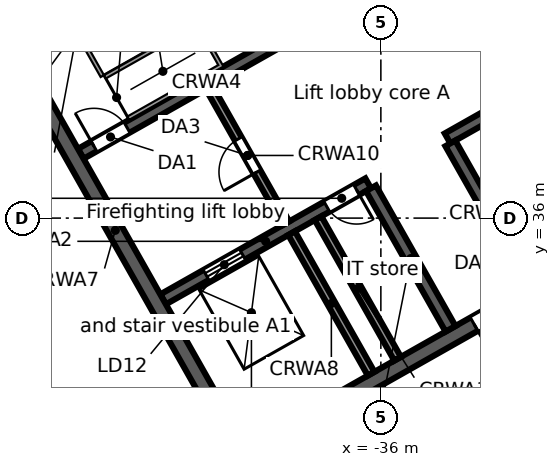
"""IFC4 building model, lengths in metres.
Left out: names, types, materials, properties, quantities, classifications, styles, units other than length and angle.
Written with IfcOpenShell. Run it as: python <this file> out.ifc"""

import sys

from ifc_helpers import new_model, si_unit, direction, frame, frame_2d, origin, place, context, subcontext, project, spatial, rectangle, extrude, element, fill, save


model = new_model("IFC4")
c1 = context("Model", 3, precision=1e-05, world=origin(), true_north=direction((0.0, 1.0)))
c2 = subcontext(c1, "Body", "Model", "MODEL_VIEW")
j1 = project(units=[si_unit("LENGTHUNIT", "METRE"), si_unit("PLANEANGLEUNIT", "RADIAN")], contexts=[c1])
p1 = place(None, origin())
s1 = spatial("IfcSite", under=j1, at=p1, CompositionType="ELEMENT")
p2 = place(p1, origin())
s2 = spatial("IfcBuilding", under=s1, at=p2, CompositionType="ELEMENT")
p3 = place(p2, frame((0.0, 0.0, 274.1)))
s3 = spatial("IfcBuildingStorey", under=s2, at=p3, CompositionType="ELEMENT", Elevation=274.1)
p4 = place(p3, frame((-58.732, 38.771, 0.0), z_axis=(0.0, 0.0, 1.0), x_axis=(0.870355615581, 0.492423702137, 0.0)))
e1 = element("IfcWall", 1, at=p4, inside=s3, PredefinedType="STANDARD", context=c2, shape_type="SweptSolid", body=[
    extrude(rectangle(XDim=64.052, YDim=0.25, at=frame_2d((32.026, 0.0))), origin(), (0.0, 0.0, 1.0), 3.52),
])
p5 = place(p4, frame((61.259, 0.0, 0.8)))
e2 = element("IfcOpeningElement", 2, at=p5, cuts=e1, PredefinedType="OPENING", context=c2, shape_type="SweptSolid", body=[
    extrude(rectangle(XDim=2.4, YDim=2.2, at=frame_2d((1.2, 1.1))), frame((0.0, 0.135, 0.0), z_axis=(0.0, -1.0, 0.0), x_axis=(1.0, 0.0, 0.0)), (0.0, 0.0, 1.0), 0.27),
])
p6 = place(p4, frame((58.216, 0.0, 0.8)))
e3 = element("IfcOpeningElement", 3, at=p6, cuts=e1, PredefinedType="OPENING", context=c2, shape_type="SweptSolid", body=[
    extrude(rectangle(XDim=2.4, YDim=2.2, at=frame_2d((1.2, 1.1))), frame((0.0, 0.135, 0.0), z_axis=(0.0, -1.0, 0.0), x_axis=(1.0, 0.0, 0.0)), (0.0, 0.0, 1.0), 0.27),
])
p7 = place(p4, frame((55.173, 0.0, 0.8)))
e4 = element("IfcOpeningElement", 4, at=p7, cuts=e1, PredefinedType="OPENING", context=c2, shape_type="SweptSolid", body=[
    extrude(rectangle(XDim=2.4, YDim=2.2, at=frame_2d((1.2, 1.1))), frame((0.0, 0.135, 0.0), z_axis=(0.0, -1.0, 0.0), x_axis=(1.0, 0.0, 0.0)), (0.0, 0.0, 1.0), 0.27),
])
p8 = place(p4, frame((52.129, 0.0, 0.8)))
e5 = element("IfcOpeningElement", 5, at=p8, cuts=e1, PredefinedType="OPENING", context=c2, shape_type="SweptSolid", body=[
    extrude(rectangle(XDim=2.4, YDim=2.2, at=frame_2d((1.2, 1.1))), frame((0.0, 0.135, 0.0), z_axis=(0.0, -1.0, 0.0), x_axis=(1.0, 0.0, 0.0)), (0.0, 0.0, 1.0), 0.27),
])
p9 = place(p4, frame((49.086, 0.0, 0.8)))
e6 = element("IfcOpeningElement", 6, at=p9, cuts=e1, PredefinedType="OPENING", context=c2, shape_type="SweptSolid", body=[
    extrude(rectangle(XDim=2.4, YDim=2.2, at=frame_2d((1.2, 1.1))), frame((0.0, 0.135, 0.0), z_axis=(0.0, -1.0, 0.0), x_axis=(1.0, 0.0, 0.0)), (0.0, 0.0, 1.0), 0.27),
])
p10 = place(p4, frame((46.043, 0.0, 0.8)))
e7 = element("IfcOpeningElement", 7, at=p10, cuts=e1, PredefinedType="OPENING", context=c2, shape_type="SweptSolid", body=[
    extrude(rectangle(XDim=2.4, YDim=2.2, at=frame_2d((1.2, 1.1))), frame((0.0, 0.135, 0.0), z_axis=(0.0, -1.0, 0.0), x_axis=(1.0, 0.0, 0.0)), (0.0, 0.0, 1.0), 0.27),
])
p11 = place(p4, frame((43.0, 0.0, 0.8)))
e8 = element("IfcOpeningElement", 8, at=p11, cuts=e1, PredefinedType="OPENING", context=c2, shape_type="SweptSolid", body=[
    extrude(rectangle(XDim=2.4, YDim=2.2, at=frame_2d((1.2, 1.1))), frame((0.0, 0.135, 0.0), z_axis=(0.0, -1.0, 0.0), x_axis=(1.0, 0.0, 0.0)), (0.0, 0.0, 1.0), 0.27),
])
p12 = place(p4, frame((39.956, 0.0, 0.8)))
e9 = element("IfcOpeningElement", 9, at=p12, cuts=e1, PredefinedType="OPENING", context=c2, shape_type="SweptSolid", body=[
    extrude(rectangle(XDim=2.4, YDim=2.2, at=frame_2d((1.2, 1.1))), frame((0.0, 0.135, 0.0), z_axis=(0.0, -1.0, 0.0), x_axis=(1.0, 0.0, 0.0)), (0.0, 0.0, 1.0), 0.27),
])
p13 = place(p4, frame((36.913, 0.0, 0.8)))
e10 = element("IfcOpeningElement", 10, at=p13, cuts=e1, PredefinedType="OPENING", context=c2, shape_type="SweptSolid", body=[
    extrude(rectangle(XDim=2.4, YDim=2.2, at=frame_2d((1.2, 1.1))), frame((0.0, 0.135, 0.0), z_axis=(0.0, -1.0, 0.0), x_axis=(1.0, 0.0, 0.0)), (0.0, 0.0, 1.0), 0.27),
])
p14 = place(p4, frame((33.87, 0.0, 0.8)))
e11 = element("IfcOpeningElement", 11, at=p14, cuts=e1, PredefinedType="OPENING", context=c2, shape_type="SweptSolid", body=[
    extrude(rectangle(XDim=2.4, YDim=2.2, at=frame_2d((1.2, 1.1))), frame((0.0, 0.135, 0.0), z_axis=(0.0, -1.0, 0.0), x_axis=(1.0, 0.0, 0.0)), (0.0, 0.0, 1.0), 0.27),
])
p15 = place(p4, frame((30.826, 0.0, 0.8)))
e12 = element("IfcOpeningElement", 12, at=p15, cuts=e1, PredefinedType="OPENING", context=c2, shape_type="SweptSolid", body=[
    extrude(rectangle(XDim=2.4, YDim=2.2, at=frame_2d((1.2, 1.1))), frame((0.0, 0.135, 0.0), z_axis=(0.0, -1.0, 0.0), x_axis=(1.0, 0.0, 0.0)), (0.0, 0.0, 1.0), 0.27),
])
p16 = place(p4, frame((27.783, 0.0, 0.8)))
e13 = element("IfcOpeningElement", 13, at=p16, cuts=e1, PredefinedType="OPENING", context=c2, shape_type="SweptSolid", body=[
    extrude(rectangle(XDim=2.4, YDim=2.2, at=frame_2d((1.2, 1.1))), frame((0.0, 0.135, 0.0), z_axis=(0.0, -1.0, 0.0), x_axis=(1.0, 0.0, 0.0)), (0.0, 0.0, 1.0), 0.27),
])
p17 = place(p4, frame((24.74, 0.0, 0.8)))
e14 = element("IfcOpeningElement", 14, at=p17, cuts=e1, PredefinedType="OPENING", context=c2, shape_type="SweptSolid", body=[
    extrude(rectangle(XDim=2.4, YDim=2.2, at=frame_2d((1.2, 1.1))), frame((0.0, 0.135, 0.0), z_axis=(0.0, -1.0, 0.0), x_axis=(1.0, 0.0, 0.0)), (0.0, 0.0, 1.0), 0.27),
])
p18 = place(p4, frame((21.696, 0.0, 0.8)))
e15 = element("IfcOpeningElement", 15, at=p18, cuts=e1, PredefinedType="OPENING", context=c2, shape_type="SweptSolid", body=[
    extrude(rectangle(XDim=2.4, YDim=2.2, at=frame_2d((1.2, 1.1))), frame((0.0, 0.135, 0.0), z_axis=(0.0, -1.0, 0.0), x_axis=(1.0, 0.0, 0.0)), (0.0, 0.0, 1.0), 0.27),
])
p19 = place(p4, frame((18.653, 0.0, 0.8)))
e16 = element("IfcOpeningElement", 16, at=p19, cuts=e1, PredefinedType="OPENING", context=c2, shape_type="SweptSolid", body=[
    extrude(rectangle(XDim=2.4, YDim=2.2, at=frame_2d((1.2, 1.1))), frame((0.0, 0.135, 0.0), z_axis=(0.0, -1.0, 0.0), x_axis=(1.0, 0.0, 0.0)), (0.0, 0.0, 1.0), 0.27),
])
p20 = place(p4, frame((15.61, 0.0, 0.8)))
e17 = element("IfcOpeningElement", 17, at=p20, cuts=e1, PredefinedType="OPENING", context=c2, shape_type="SweptSolid", body=[
    extrude(rectangle(XDim=2.4, YDim=2.2, at=frame_2d((1.2, 1.1))), frame((0.0, 0.135, 0.0), z_axis=(0.0, -1.0, 0.0), x_axis=(1.0, 0.0, 0.0)), (0.0, 0.0, 1.0), 0.27),
])
p21 = place(p4, frame((12.567, 0.0, 0.8)))
e18 = element("IfcOpeningElement", 18, at=p21, cuts=e1, PredefinedType="OPENING", context=c2, shape_type="SweptSolid", body=[
    extrude(rectangle(XDim=2.4, YDim=2.2, at=frame_2d((1.2, 1.1))), frame((0.0, 0.135, 0.0), z_axis=(0.0, -1.0, 0.0), x_axis=(1.0, 0.0, 0.0)), (0.0, 0.0, 1.0), 0.27),
])
p22 = place(p4, frame((9.523, 0.0, 0.8)))
e19 = element("IfcOpeningElement", 19, at=p22, cuts=e1, PredefinedType="OPENING", context=c2, shape_type="SweptSolid", body=[
    extrude(rectangle(XDim=2.4, YDim=2.2, at=frame_2d((1.2, 1.1))), frame((0.0, 0.135, 0.0), z_axis=(0.0, -1.0, 0.0), x_axis=(1.0, 0.0, 0.0)), (0.0, 0.0, 1.0), 0.27),
])
p23 = place(p4, frame((6.48, 0.0, 0.8)))
e20 = element("IfcOpeningElement", 20, at=p23, cuts=e1, PredefinedType="OPENING", context=c2, shape_type="SweptSolid", body=[
    extrude(rectangle(XDim=2.4, YDim=2.2, at=frame_2d((1.2, 1.1))), frame((0.0, 0.135, 0.0), z_axis=(0.0, -1.0, 0.0), x_axis=(1.0, 0.0, 0.0)), (0.0, 0.0, 1.0), 0.27),
])
p24 = place(p4, frame((3.437, 0.0, 0.8)))
e21 = element("IfcOpeningElement", 21, at=p24, cuts=e1, PredefinedType="OPENING", context=c2, shape_type="SweptSolid", body=[
    extrude(rectangle(XDim=2.4, YDim=2.2, at=frame_2d((1.2, 1.1))), frame((0.0, 0.135, 0.0), z_axis=(0.0, -1.0, 0.0), x_axis=(1.0, 0.0, 0.0)), (0.0, 0.0, 1.0), 0.27),
])
p25 = place(p4, frame((0.393, 0.0, 0.8)))
e22 = element("IfcOpeningElement", 22, at=p25, cuts=e1, PredefinedType="OPENING", context=c2, shape_type="SweptSolid", body=[
    extrude(rectangle(XDim=2.4, YDim=2.2, at=frame_2d((1.2, 1.1))), frame((0.0, 0.135, 0.0), z_axis=(0.0, -1.0, 0.0), x_axis=(1.0, 0.0, 0.0)), (0.0, 0.0, 1.0), 0.27),
])
p26 = place(p3, frame((-44.115, 26.507, 0.0), z_axis=(0.0, 0.0, 1.0), x_axis=(-0.857166583633, 0.515039268311, 0.0)))
e23 = element("IfcWall", 23, at=p26, inside=s3, PredefinedType="STANDARD", context=c2, shape_type="SweptSolid", body=[
    extrude(rectangle(XDim=17.106, YDim=0.25, at=frame_2d((8.553, 0.0))), origin(), (0.0, 0.0, 1.0), 3.52),
])
p27 = place(p26, frame((14.417, 0.0, 0.8)))
e24 = element("IfcOpeningElement", 24, at=p27, cuts=e23, PredefinedType="OPENING", context=c2, shape_type="SweptSolid", body=[
    extrude(rectangle(XDim=2.4, YDim=2.2, at=frame_2d((1.2, 1.1))), frame((0.0, 0.135, 0.0), z_axis=(0.0, -1.0, 0.0), x_axis=(1.0, 0.0, 0.0)), (0.0, 0.0, 1.0), 0.27),
])
p28 = place(p26, frame((11.584, 0.0, 0.8)))
e25 = element("IfcOpeningElement", 25, at=p28, cuts=e23, PredefinedType="OPENING", context=c2, shape_type="SweptSolid", body=[
    extrude(rectangle(XDim=2.4, YDim=2.2, at=frame_2d((1.2, 1.1))), frame((0.0, 0.135, 0.0), z_axis=(0.0, -1.0, 0.0), x_axis=(1.0, 0.0, 0.0)), (0.0, 0.0, 1.0), 0.27),
])
p29 = place(p26, frame((8.75, 0.0, 0.8)))
e26 = element("IfcOpeningElement", 26, at=p29, cuts=e23, PredefinedType="OPENING", context=c2, shape_type="SweptSolid", body=[
    extrude(rectangle(XDim=2.4, YDim=2.2, at=frame_2d((1.2, 1.1))), frame((0.0, 0.135, 0.0), z_axis=(0.0, -1.0, 0.0), x_axis=(1.0, 0.0, 0.0)), (0.0, 0.0, 1.0), 0.27),
])
p30 = place(p26, frame((5.917, 0.0, 0.8)))
e27 = element("IfcOpeningElement", 27, at=p30, cuts=e23, PredefinedType="OPENING", context=c2, shape_type="SweptSolid", body=[
    extrude(rectangle(XDim=2.4, YDim=2.2, at=frame_2d((1.2, 1.1))), frame((0.0, 0.135, 0.0), z_axis=(0.0, -1.0, 0.0), x_axis=(1.0, 0.0, 0.0)), (0.0, 0.0, 1.0), 0.27),
])
p31 = place(p26, frame((3.084, 0.0, 0.8)))
e28 = element("IfcOpeningElement", 28, at=p31, cuts=e23, PredefinedType="OPENING", context=c2, shape_type="SweptSolid", body=[
    extrude(rectangle(XDim=2.4, YDim=2.2, at=frame_2d((1.2, 1.1))), frame((0.0, 0.135, 0.0), z_axis=(0.0, -1.0, 0.0), x_axis=(1.0, 0.0, 0.0)), (0.0, 0.0, 1.0), 0.27),
])
p32 = place(p26, frame((0.25, 0.0, 0.8)))
e29 = element("IfcOpeningElement", 29, at=p32, cuts=e23, PredefinedType="OPENING", context=c2, shape_type="SweptSolid", body=[
    extrude(rectangle(XDim=2.4, YDim=2.2, at=frame_2d((1.2, 1.1))), frame((0.0, 0.135, 0.0), z_axis=(0.0, -1.0, 0.0), x_axis=(1.0, 0.0, 0.0)), (0.0, 0.0, 1.0), 0.27),
])
p33 = place(p3, frame((-3.017, 46.293, 0.0), z_axis=(0.0, 0.0, 1.0), x_axis=(-0.870355474887, -0.492423950812, 0.0)))
e30 = element("IfcWall", 30, at=p33, inside=s3, PredefinedType="STANDARD", context=c2, shape_type="SweptSolid", body=[
    extrude(rectangle(XDim=40.34, YDim=0.25, at=frame_2d((20.17, 0.0))), origin(), (0.0, 0.0, 1.0), 3.52),
])
p34 = place(p33, frame((37.428, 0.0, 0.8)))
e31 = element("IfcOpeningElement", 31, at=p34, cuts=e30, PredefinedType="OPENING", context=c2, shape_type="SweptSolid", body=[
    extrude(rectangle(XDim=2.4, YDim=2.2, at=frame_2d((1.2, 1.1))), frame((0.0, 0.135, 0.0), z_axis=(0.0, -1.0, 0.0), x_axis=(1.0, 0.0, 0.0)), (0.0, 0.0, 1.0), 0.27),
])
p35 = place(p33, frame((34.372, 0.0, 0.0)))
e32 = element("IfcOpeningElement", 32, at=p35, cuts=e30, PredefinedType="OPENING", context=c2, shape_type="SweptSolid", body=[
    extrude(rectangle(XDim=1.8, YDim=2.4, at=frame_2d((0.9, 1.2))), frame((0.0, 0.135, 0.0), z_axis=(0.0, -1.0, 0.0), x_axis=(1.0, 0.0, 0.0)), (0.0, 0.0, 1.0), 0.27),
])
p36 = place(p33, frame((30.716, 0.0, 0.8)))
e33 = element("IfcOpeningElement", 33, at=p36, cuts=e30, PredefinedType="OPENING", context=c2, shape_type="SweptSolid", body=[
    extrude(rectangle(XDim=2.4, YDim=2.2, at=frame_2d((1.2, 1.1))), frame((0.0, 0.135, 0.0), z_axis=(0.0, -1.0, 0.0), x_axis=(1.0, 0.0, 0.0)), (0.0, 0.0, 1.0), 0.27),
])
p37 = place(p33, frame((27.36, 0.0, 0.8)))
e34 = element("IfcOpeningElement", 34, at=p37, cuts=e30, PredefinedType="OPENING", context=c2, shape_type="SweptSolid", body=[
    extrude(rectangle(XDim=2.4, YDim=2.2, at=frame_2d((1.2, 1.1))), frame((0.0, 0.135, 0.0), z_axis=(0.0, -1.0, 0.0), x_axis=(1.0, 0.0, 0.0)), (0.0, 0.0, 1.0), 0.27),
])
p38 = place(p33, frame((24.304, 0.0, 0.0)))
e35 = element("IfcOpeningElement", 35, at=p38, cuts=e30, PredefinedType="OPENING", context=c2, shape_type="SweptSolid", body=[
    extrude(rectangle(XDim=1.8, YDim=2.4, at=frame_2d((0.9, 1.2))), frame((0.0, 0.135, 0.0), z_axis=(0.0, -1.0, 0.0), x_axis=(1.0, 0.0, 0.0)), (0.0, 0.0, 1.0), 0.27),
])
p39 = place(p33, frame((20.648, 0.0, 0.8)))
e36 = element("IfcOpeningElement", 36, at=p39, cuts=e30, PredefinedType="OPENING", context=c2, shape_type="SweptSolid", body=[
    extrude(rectangle(XDim=2.4, YDim=2.2, at=frame_2d((1.2, 1.1))), frame((0.0, 0.135, 0.0), z_axis=(0.0, -1.0, 0.0), x_axis=(1.0, 0.0, 0.0)), (0.0, 0.0, 1.0), 0.27),
])
p40 = place(p33, frame((17.292, 0.0, 0.8)))
e37 = element("IfcOpeningElement", 37, at=p40, cuts=e30, PredefinedType="OPENING", context=c2, shape_type="SweptSolid", body=[
    extrude(rectangle(XDim=2.4, YDim=2.2, at=frame_2d((1.2, 1.1))), frame((0.0, 0.135, 0.0), z_axis=(0.0, -1.0, 0.0), x_axis=(1.0, 0.0, 0.0)), (0.0, 0.0, 1.0), 0.27),
])
p41 = place(p33, frame((14.236, 0.0, 0.0)))
e38 = element("IfcOpeningElement", 38, at=p41, cuts=e30, PredefinedType="OPENING", context=c2, shape_type="SweptSolid", body=[
    extrude(rectangle(XDim=1.8, YDim=2.4, at=frame_2d((0.9, 1.2))), frame((0.0, 0.135, 0.0), z_axis=(0.0, -1.0, 0.0), x_axis=(1.0, 0.0, 0.0)), (0.0, 0.0, 1.0), 0.27),
])
p42 = place(p33, frame((10.58, 0.0, 0.8)))
e39 = element("IfcOpeningElement", 39, at=p42, cuts=e30, PredefinedType="OPENING", context=c2, shape_type="SweptSolid", body=[
    extrude(rectangle(XDim=2.4, YDim=2.2, at=frame_2d((1.2, 1.1))), frame((0.0, 0.135, 0.0), z_axis=(0.0, -1.0, 0.0), x_axis=(1.0, 0.0, 0.0)), (0.0, 0.0, 1.0), 0.27),
])
p43 = place(p33, frame((7.224, 0.0, 0.8)))
e40 = element("IfcOpeningElement", 40, at=p43, cuts=e30, PredefinedType="OPENING", context=c2, shape_type="SweptSolid", body=[
    extrude(rectangle(XDim=2.4, YDim=2.2, at=frame_2d((1.2, 1.1))), frame((0.0, 0.135, 0.0), z_axis=(0.0, -1.0, 0.0), x_axis=(1.0, 0.0, 0.0)), (0.0, 0.0, 1.0), 0.27),
])
p44 = place(p33, frame((4.168, 0.0, 0.0)))
e41 = element("IfcOpeningElement", 41, at=p44, cuts=e30, PredefinedType="OPENING", context=c2, shape_type="SweptSolid", body=[
    extrude(rectangle(XDim=1.8, YDim=2.4, at=frame_2d((0.9, 1.2))), frame((0.0, 0.135, 0.0), z_axis=(0.0, -1.0, 0.0), x_axis=(1.0, 0.0, 0.0)), (0.0, 0.0, 1.0), 0.27),
])
p45 = place(p33, frame((0.512, 0.0, 0.8)))
e42 = element("IfcOpeningElement", 42, at=p45, cuts=e30, PredefinedType="OPENING", context=c2, shape_type="SweptSolid", body=[
    extrude(rectangle(XDim=2.4, YDim=2.2, at=frame_2d((1.2, 1.1))), frame((0.0, 0.135, 0.0), z_axis=(0.0, -1.0, 0.0), x_axis=(1.0, 0.0, 0.0)), (0.0, 0.0, 1.0), 0.27),
])
p46 = place(p3, frame((-39.813, 29.662, 0.0), z_axis=(0.0, 0.0, 1.0), x_axis=(0.870350116061, 0.492433422375, 0.0)))
e43 = element("IfcWall", 43, at=p46, inside=s3, PredefinedType="SOLIDWALL", context=c2, shape_type="SweptSolid", body=[
    extrude(rectangle(XDim=17.0, YDim=0.4, at=frame_2d((8.5, 0.0))), origin(), (0.0, 0.0, 1.0), 3.52),
])
p47 = place(p46, frame((7.2, 0.0, 0.0)))
e44 = element("IfcOpeningElement", 44, at=p47, cuts=e43, PredefinedType="OPENING", context=c2, shape_type="SweptSolid", body=[
    extrude(rectangle(XDim=1.2, YDim=2.1, at=frame_2d((0.6, 1.05))), frame((0.0, 0.21, 0.0), z_axis=(0.0, -1.0, 0.0), x_axis=(1.0, 0.0, 0.0)), (0.0, 0.0, 1.0), 0.42),
])
p48 = place(p3, frame((-41.73, 33.863, 0.0), z_axis=(0.0, 0.0, 1.0), x_axis=(0.870350800578, 0.492432212525, 0.0)))
e45 = element("IfcWall", 45, at=p48, inside=s3, PredefinedType="SOLIDWALL", context=c2, shape_type="SweptSolid", body=[
    extrude(rectangle(XDim=6.2, YDim=0.3, at=frame_2d((3.1, 0.0))), origin(), (0.0, 0.0, 1.0), 3.52),
])
p49 = place(p48, frame((1.3, 0.0, 0.0)))
e46 = element("IfcOpeningElement", 46, at=p49, cuts=e45, PredefinedType="OPENING", context=c2, shape_type="SweptSolid", body=[
    extrude(rectangle(XDim=1.1, YDim=2.1, at=frame_2d((0.55, 1.05))), frame((0.0, 0.16, 0.0), z_axis=(0.0, -1.0, 0.0), x_axis=(1.0, 0.0, 0.0)), (0.0, 0.0, 1.0), 0.32),
])
p50 = place(p48, frame((4.95, 0.0, 0.0)))
e47 = element("IfcOpeningElement", 47, at=p50, cuts=e45, PredefinedType="OPENING", context=c2, shape_type="SweptSolid", body=[
    extrude(rectangle(XDim=0.9, YDim=2.1, at=frame_2d((0.45, 1.05))), frame((0.0, 0.16, 0.0), z_axis=(0.0, -1.0, 0.0), x_axis=(1.0, 0.0, 0.0)), (0.0, 0.0, 1.0), 0.32),
])
p51 = place(p3, frame((-34.245, 38.097, 0.0), z_axis=(0.0, 0.0, 1.0), x_axis=(0.870356351998, 0.492422400523, 0.0)))
e48 = element("IfcWall", 48, at=p51, inside=s3, PredefinedType="SOLIDWALL", context=c2, shape_type="SweptSolid", body=[
    extrude(rectangle(XDim=7.6, YDim=0.3, at=frame_2d((3.8, 0.0))), origin(), (0.0, 0.0, 1.0), 3.52),
])
p52 = place(p51, frame((6.2, 0.0, 0.0)))
e49 = element("IfcOpeningElement", 49, at=p52, cuts=e48, PredefinedType="OPENING", context=c2, shape_type="SweptSolid", body=[
    extrude(rectangle(XDim=1.0, YDim=2.1, at=frame_2d((0.5, 1.05))), frame((0.0, 0.16, 0.0), z_axis=(0.0, -1.0, 0.0), x_axis=(1.0, 0.0, 0.0)), (0.0, 0.0, 1.0), 0.32),
])
p53 = place(p3, frame((-43.897, 37.692, 0.0), z_axis=(0.0, 0.0, 1.0), x_axis=(0.870356351998, 0.492422400523, 0.0)))
e50 = element("IfcWall", 50, at=p53, inside=s3, PredefinedType="SOLIDWALL", context=c2, shape_type="SweptSolid", body=[
    extrude(rectangle(XDim=7.6, YDim=0.3, at=frame_2d((3.8, 0.0))), origin(), (0.0, 0.0, 1.0), 3.52),
])
p54 = place(p53, frame((0.4, 0.0, 0.0)))
e51 = element("IfcOpeningElement", 51, at=p54, cuts=e50, PredefinedType="OPENING", context=c2, shape_type="SweptSolid", body=[
    extrude(rectangle(XDim=1.0, YDim=2.1, at=frame_2d((0.5, 1.05))), frame((0.0, 0.16, 0.0), z_axis=(0.0, -1.0, 0.0), x_axis=(1.0, 0.0, 0.0)), (0.0, 0.0, 1.0), 0.32),
])
p55 = place(p3, frame((-46.238, 41.423, 0.0), z_axis=(0.0, 0.0, 1.0), x_axis=(0.492421663121, -0.870356769198, 0.0)))
e52 = element("IfcWall", 52, at=p55, inside=s3, PredefinedType="SOLIDWALL", context=c2, shape_type="SweptSolid", body=[
    extrude(rectangle(XDim=13.2, YDim=0.4, at=frame_2d((6.6, 0.0))), origin(), (0.0, 0.0, 1.0), 3.52),
])
p56 = place(p3, frame((-38.349, 35.603, 0.0), z_axis=(0.0, 0.0, 1.0), x_axis=(0.492397924348, -0.870370199454, 0.0)))
e53 = element("IfcWall", 53, at=p56, inside=s3, PredefinedType="SOLIDWALL", context=c2, shape_type="SweptSolid", body=[
    extrude(rectangle(XDim=4.25, YDim=0.2, at=frame_2d((2.125, 0.0))), origin(), (0.0, 0.0, 1.0), 3.52),
])
p57 = place(p3, frame((-40.516, 39.433, 0.0), z_axis=(0.0, 0.0, 1.0), x_axis=(0.492453559952, -0.87033872216, 0.0)))
e54 = element("IfcWall", 54, at=p57, inside=s3, PredefinedType="PARTITIONING", context=c2, shape_type="SweptSolid", body=[
    extrude(rectangle(XDim=4.1, YDim=0.2, at=frame_2d((2.05, 0.0))), origin(), (0.0, 0.0, 1.0), 3.52),
])
p58 = place(p57, frame((1.55, 0.0, 0.0)))
e55 = element("IfcOpeningElement", 55, at=p58, cuts=e54, PredefinedType="OPENING", context=c2, shape_type="SweptSolid", body=[
    extrude(rectangle(XDim=1.0, YDim=2.1, at=frame_2d((0.5, 1.05))), frame((0.0, 0.11, 0.0), z_axis=(0.0, -1.0, 0.0), x_axis=(1.0, 0.0, 0.0)), (0.0, 0.0, 1.0), 0.22),
])
p59 = place(p3, frame((-37.653, 35.997, 0.0), z_axis=(0.0, 0.0, 1.0), x_axis=(0.492422543467, -0.870356271124, 0.0)))
e56 = element("IfcWall", 56, at=p59, inside=s3, PredefinedType="SOLIDWALL", context=c2, shape_type="SweptSolid", body=[
    extrude(rectangle(XDim=4.25, YDim=0.2, at=frame_2d((2.125, 0.0))), origin(), (0.0, 0.0, 1.0), 3.52),
])
for number, where, z_axis, x_axis in (
    (57, (-36.26, 36.785, 0.0), (0.0, 0.0, 1.0), (0.492, -0.87, 0.0)),
    (58, (-34.171, 37.967, 0.0), (0.0, 0.0, 1.0), (0.492, -0.87, 0.0)),
):
    element("IfcWall", number, at=place(p3, frame(where, z_axis=z_axis, x_axis=x_axis)), inside=s3, PredefinedType="SOLIDWALL", context=c2, shape_type="SweptSolid", body=[
        extrude(rectangle(XDim=4.25, YDim=0.3, at=frame_2d((2.125, 0.0))), origin(), (0.0, 0.0, 1.0), 3.52),
    ])
p60 = place(p49, origin())
e59 = element("IfcDoor", 59, at=p60, inside=s3, OperationType="DOUBLE_DOOR_SLIDING", PredefinedType="DOOR", context=c2, shape_type="SweptSolid", body=[
    extrude(rectangle(XDim=1.1, YDim=2.1, at=frame_2d((0.55, 1.05))), frame((0.0, 0.025, 0.0), z_axis=(0.0, -1.0, 0.0), x_axis=(1.0, 0.0, 0.0)), (0.0, 0.0, 1.0), 0.05),
])
fill(e46, e59)
p61 = place(p54, origin())
e60 = element("IfcDoor", 60, at=p61, inside=s3, OperationType="SINGLE_SWING_LEFT", PredefinedType="DOOR", context=c2, shape_type="SweptSolid", body=[
    extrude(rectangle(XDim=1.0, YDim=2.1, at=frame_2d((0.5, 1.05))), frame((0.0, 0.025, 0.0), z_axis=(0.0, -1.0, 0.0), x_axis=(1.0, 0.0, 0.0)), (0.0, 0.0, 1.0), 0.05),
])
fill(e51, e60)
p62 = place(p58, frame((1.0, 0.0, 0.0), z_axis=(0.0, 0.0, 1.0), x_axis=(-1.0, 0.0, 0.0)))
e61 = element("IfcDoor", 61, at=p62, inside=s3, OperationType="SINGLE_SWING_LEFT", PredefinedType="DOOR", context=c2, shape_type="SweptSolid", body=[
    extrude(rectangle(XDim=1.0, YDim=2.1, at=frame_2d((0.5, 1.05))), frame((0.0, 0.025, 0.0), z_axis=(0.0, -1.0, 0.0), x_axis=(1.0, 0.0, 0.0)), (0.0, 0.0, 1.0), 0.05),
])
fill(e55, e61)
p63 = place(p47, frame((1.2, 0.0, 0.0), z_axis=(0.0, 0.0, 1.0), x_axis=(-1.0, 0.0, 0.0)))
e62 = element("IfcDoor", 62, at=p63, inside=s3, OperationType="SINGLE_SWING_RIGHT", PredefinedType="DOOR", context=c2, shape_type="SweptSolid", body=[
    extrude(rectangle(XDim=1.2, YDim=2.1, at=frame_2d((0.6, 1.05))), frame((0.0, 0.025, 0.0), z_axis=(0.0, -1.0, 0.0), x_axis=(1.0, 0.0, 0.0)), (0.0, 0.0, 1.0), 0.05),
])
fill(e44, e62)
p64 = place(p50, frame((0.9, 0.0, 0.0), z_axis=(0.0, 0.0, 1.0), x_axis=(-1.0, 0.0, 0.0)))
e63 = element("IfcDoor", 63, at=p64, inside=s3, OperationType="SINGLE_SWING_LEFT", PredefinedType="DOOR", context=c2, shape_type="SweptSolid", body=[
    extrude(rectangle(XDim=0.9, YDim=2.1, at=frame_2d((0.45, 1.05))), frame((0.0, 0.025, 0.0), z_axis=(0.0, -1.0, 0.0), x_axis=(1.0, 0.0, 0.0)), (0.0, 0.0, 1.0), 0.05),
])
fill(e47, e63)
save(model, sys.argv[1])
